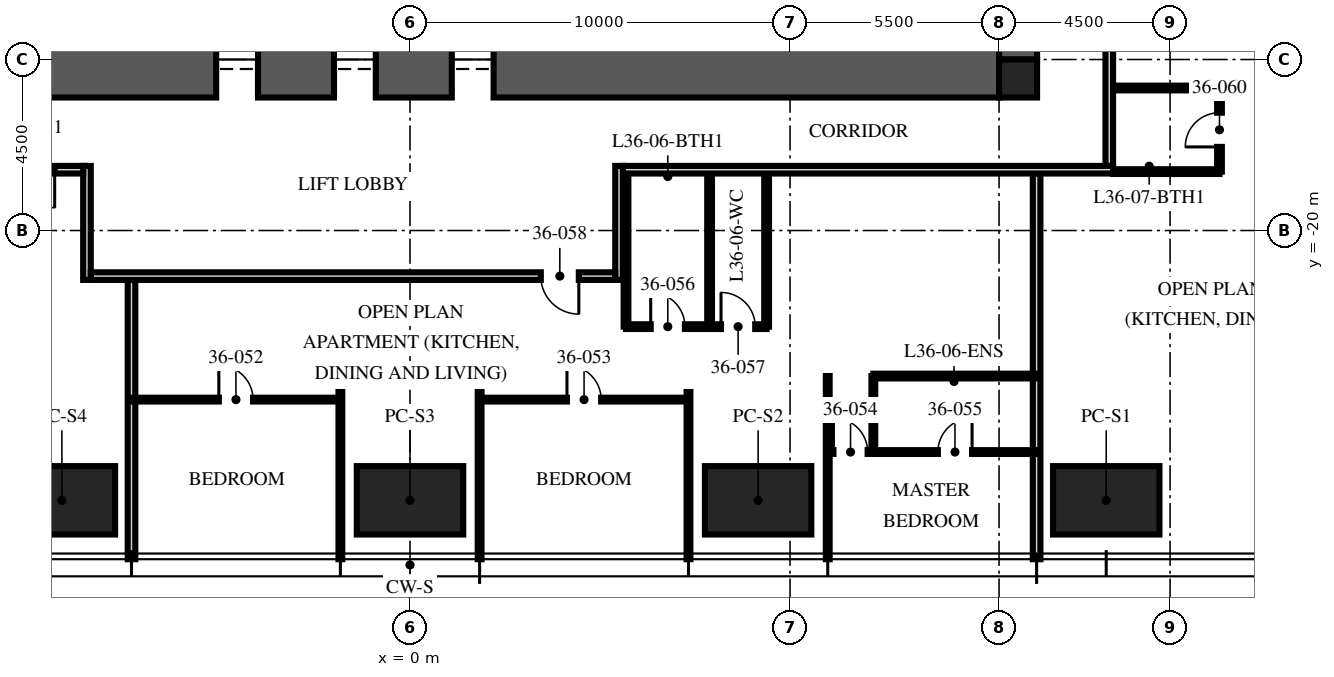
"""IFC4 building model, lengths in metres.
Left out: names, types, materials, properties, quantities, classifications, styles, units other than length and angle.
Written with IfcOpenShell. Run it as: python <this file> out.ifc"""

import sys

from ifc_helpers import new_model, si_unit, direction, frame, frame_2d, origin, origin_2d, place, context, subcontext, project, spatial, rectangle, extrude, element, fill, save


model = new_model("IFC4")
c1 = context("Model", 3, precision=1e-05, world=origin(), true_north=direction((0.0, 1.0)))
c2 = subcontext(c1, "Body", "Model", "MODEL_VIEW")
j1 = project(units=[si_unit("LENGTHUNIT", "METRE"), si_unit("PLANEANGLEUNIT", "RADIAN")], contexts=[c1])
p1 = place(None, origin())
s1 = spatial("IfcSite", under=j1, at=p1, CompositionType="ELEMENT")
p2 = place(p1, origin())
s2 = spatial("IfcBuilding", under=s1, at=p2, CompositionType="ELEMENT")
p3 = place(p2, frame((0.0, 0.0, 144.75)))
s3 = spatial("IfcBuildingStorey", under=s2, at=p3, CompositionType="ELEMENT", Elevation=144.75)
p4 = place(p3, frame((15.5, -15.5, -0.25), z_axis=(0.0, 0.0, 1.0), x_axis=(0.0, 1.0, 0.0)))
e1 = element("IfcWall", 1, at=p4, inside=s3, PredefinedType="SHEAR", context=c2, shape_type="SweptSolid", body=[
    extrude(rectangle(XDim=31.0, YDim=2.0, at=frame_2d((15.5, 0.0))), origin(), (0.0, 0.0, 1.0), 3.75),
])
p5 = place(p4, frame((6.5, 0.0, 0.25)))
e2 = element("IfcOpeningElement", 2, at=p5, cuts=e1, PredefinedType="OPENING", context=c2, shape_type="SweptSolid", body=[
    extrude(rectangle(XDim=1.2, YDim=2.1, at=frame_2d((0.6, 1.05))), frame((0.0, 1.01, 0.0), z_axis=(0.0, -1.0, 0.0), x_axis=(1.0, 0.0, 0.0)), (0.0, 0.0, 1.0), 2.02),
])
p6 = place(p4, frame((23.0, 0.0, 0.25)))
e3 = element("IfcOpeningElement", 3, at=p6, cuts=e1, PredefinedType="OPENING", context=c2, shape_type="SweptSolid", body=[
    extrude(rectangle(XDim=1.8, YDim=2.1, at=frame_2d((0.9, 1.05))), frame((0.0, 1.01, 0.0), z_axis=(0.0, -1.0, 0.0), x_axis=(1.0, 0.0, 0.0)), (0.0, 0.0, 1.0), 2.02),
])
p7 = place(p3, frame((-15.5, -15.5, -0.25), z_axis=(0.0, 0.0, 1.0), x_axis=(1.0, 0.0, 0.0)))
e4 = element("IfcWall", 4, at=p7, inside=s3, PredefinedType="SHEAR", context=c2, shape_type="SweptSolid", body=[
    extrude(rectangle(XDim=31.0, YDim=2.0, at=frame_2d((15.5, 0.0))), origin(), (0.0, 0.0, 1.0), 3.75),
])
p8 = place(p7, frame((10.4, 0.0, 0.25)))
e5 = element("IfcOpeningElement", 5, at=p8, cuts=e4, PredefinedType="OPENING", context=c2, shape_type="SweptSolid", body=[
    extrude(rectangle(XDim=1.1, YDim=2.1, at=frame_2d((0.55, 1.05))), frame((0.0, 1.01, 0.0), z_axis=(0.0, -1.0, 0.0), x_axis=(1.0, 0.0, 0.0)), (0.0, 0.0, 1.0), 2.02),
])
p9 = place(p7, frame((13.5, 0.0, 0.25)))
e6 = element("IfcOpeningElement", 6, at=p9, cuts=e4, PredefinedType="OPENING", context=c2, shape_type="SweptSolid", body=[
    extrude(rectangle(XDim=1.1, YDim=2.1, at=frame_2d((0.55, 1.05))), frame((0.0, 1.01, 0.0), z_axis=(0.0, -1.0, 0.0), x_axis=(1.0, 0.0, 0.0)), (0.0, 0.0, 1.0), 2.02),
])
p10 = place(p7, frame((16.6, 0.0, 0.25)))
e7 = element("IfcOpeningElement", 7, at=p10, cuts=e4, PredefinedType="OPENING", context=c2, shape_type="SweptSolid", body=[
    extrude(rectangle(XDim=1.1, YDim=2.1, at=frame_2d((0.55, 1.05))), frame((0.0, 1.01, 0.0), z_axis=(0.0, -1.0, 0.0), x_axis=(1.0, 0.0, 0.0)), (0.0, 0.0, 1.0), 2.02),
])
p11 = place(p3, frame((16.0, -16.0, -0.25), z_axis=(0.0, 0.0, 1.0), x_axis=(1.0, 0.0, 0.0)))
e8 = element("IfcColumn", 8, at=p11, inside=s3, PredefinedType="COLUMN", context=c2, shape_type="SweptSolid", body=[
    extrude(rectangle(XDim=1.0, YDim=1.0, at=origin_2d()), origin(), (0.0, 0.0, 1.0), 3.75),
])
for number, where, z_axis, x_axis in (
    (9, (18.32, -27.1, 0.0), (0.0, 0.0, 1.0), (1.0, 0.0, 0.0)),
    (10, (9.16, -27.1, 0.0), (0.0, 0.0, 1.0), (1.0, 0.0, 0.0)),
    (11, (0.0, -27.1, 0.0), (0.0, 0.0, 1.0), (1.0, 0.0, 0.0)),
    (12, (-9.16, -27.1, 0.0), (0.0, 0.0, 1.0), (1.0, 0.0, 0.0)),
):
    element("IfcColumn", number, at=place(p3, frame(where, z_axis=z_axis, x_axis=x_axis)), inside=s3, PredefinedType="COLUMN", context=c2, shape_type="SweptSolid", body=[
        extrude(rectangle(XDim=2.8, YDim=1.8, at=origin_2d()), origin(), (0.0, 0.0, 1.0), 3.75),
    ])
p12 = place(p3, frame((-7.328, -21.3, 0.0), z_axis=(0.0, 0.0, 1.0), x_axis=(0.0, -1.0, 0.0)))
e13 = element("IfcWall", 13, at=p12, inside=s3, PredefinedType="PARTITIONING", context=c2, shape_type="SweptSolid", body=[
    extrude(rectangle(XDim=7.35, YDim=0.2, at=frame_2d((3.675, 0.0))), origin(), (0.0, 0.0, 1.0), 2.81),
])
for number, where, z_axis, x_axis in (
    (14, (-1.832, -24.25, 0.0), (0.0, 0.0, 1.0), (0.0, -1.0, 0.0)),
    (15, (1.832, -24.25, 0.0), (0.0, 0.0, 1.0), (0.0, -1.0, 0.0)),
    (16, (7.328, -24.25, 0.0), (0.0, 0.0, 1.0), (0.0, -1.0, 0.0)),
):
    element("IfcWall", number, at=place(p3, frame(where, z_axis=z_axis, x_axis=x_axis)), inside=s3, PredefinedType="PARTITIONING", context=c2, shape_type="SweptSolid", body=[
        extrude(rectangle(XDim=4.4, YDim=0.1, at=frame_2d((2.2, 0.0))), origin(), (0.0, 0.0, 1.0), 2.81),
    ])
p13 = place(p3, frame((10.992, -23.83, 0.0), z_axis=(0.0, 0.0, 1.0), x_axis=(0.0, -1.0, 0.0)))
e17 = element("IfcWall", 17, at=p13, inside=s3, PredefinedType="PARTITIONING", context=c2, shape_type="SweptSolid", body=[
    extrude(rectangle(XDim=4.82, YDim=0.1, at=frame_2d((2.41, 0.0))), origin(), (0.0, 0.0, 1.0), 2.81),
])
p14 = place(p3, frame((16.488, -18.5, 0.0), z_axis=(0.0, 0.0, 1.0), x_axis=(0.0, -1.0, 0.0)))
e18 = element("IfcWall", 18, at=p14, inside=s3, PredefinedType="PARTITIONING", context=c2, shape_type="SweptSolid", body=[
    extrude(rectangle(XDim=10.15, YDim=0.2, at=frame_2d((5.075, 0.0))), origin(), (0.0, 0.0, 1.0), 2.81),
])
p15 = place(p3, frame((-7.328, -24.45, 0.0), z_axis=(0.0, 0.0, 1.0), x_axis=(1.0, 0.0, 0.0)))
e19 = element("IfcWall", 19, at=p15, inside=s3, PredefinedType="PARTITIONING", context=c2, shape_type="SweptSolid", body=[
    extrude(rectangle(XDim=5.496, YDim=0.1, at=frame_2d((2.748, 0.0))), origin(), (0.0, 0.0, 1.0), 2.81),
])
p16 = place(p15, frame((2.298, 0.0, 0.0)))
e20 = element("IfcOpeningElement", 20, at=p16, cuts=e19, PredefinedType="OPENING", context=c2, shape_type="SweptSolid", body=[
    extrude(rectangle(XDim=0.9, YDim=2.1, at=frame_2d((0.45, 1.05))), frame((0.0, 0.06, 0.0), z_axis=(0.0, -1.0, 0.0), x_axis=(1.0, 0.0, 0.0)), (0.0, 0.0, 1.0), 0.12),
])
p17 = place(p3, frame((1.832, -24.45, 0.0), z_axis=(0.0, 0.0, 1.0), x_axis=(1.0, 0.0, 0.0)))
e21 = element("IfcWall", 21, at=p17, inside=s3, PredefinedType="PARTITIONING", context=c2, shape_type="SweptSolid", body=[
    extrude(rectangle(XDim=5.496, YDim=0.1, at=frame_2d((2.748, 0.0))), origin(), (0.0, 0.0, 1.0), 2.81),
])
p18 = place(p17, frame((2.298, 0.0, 0.0)))
e22 = element("IfcOpeningElement", 22, at=p18, cuts=e21, PredefinedType="OPENING", context=c2, shape_type="SweptSolid", body=[
    extrude(rectangle(XDim=0.9, YDim=2.1, at=frame_2d((0.45, 1.05))), frame((0.0, 0.06, 0.0), z_axis=(0.0, -1.0, 0.0), x_axis=(1.0, 0.0, 0.0)), (0.0, 0.0, 1.0), 0.12),
])
p19 = place(p3, frame((10.992, -25.83, 0.0), z_axis=(0.0, 0.0, 1.0), x_axis=(1.0, 0.0, 0.0)))
e23 = element("IfcWall", 23, at=p19, inside=s3, PredefinedType="PARTITIONING", context=c2, shape_type="SweptSolid", body=[
    extrude(rectangle(XDim=5.496, YDim=0.1, at=frame_2d((2.748, 0.0))), origin(), (0.0, 0.0, 1.0), 2.81),
])
p20 = place(p19, frame((0.15, 0.0, 0.0)))
e24 = element("IfcOpeningElement", 24, at=p20, cuts=e23, PredefinedType="OPENING", context=c2, shape_type="SweptSolid", body=[
    extrude(rectangle(XDim=0.9, YDim=2.1, at=frame_2d((0.45, 1.05))), frame((0.0, 0.06, 0.0), z_axis=(0.0, -1.0, 0.0), x_axis=(1.0, 0.0, 0.0)), (0.0, 0.0, 1.0), 0.12),
])
p21 = place(p19, frame((2.898, 0.0, 0.0)))
e25 = element("IfcOpeningElement", 25, at=p21, cuts=e23, PredefinedType="OPENING", context=c2, shape_type="SweptSolid", body=[
    extrude(rectangle(XDim=0.9, YDim=2.1, at=frame_2d((0.45, 1.05))), frame((0.0, 0.06, 0.0), z_axis=(0.0, -1.0, 0.0), x_axis=(1.0, 0.0, 0.0)), (0.0, 0.0, 1.0), 0.12),
])
p22 = place(p3, frame((12.192, -23.83, 0.0), z_axis=(0.0, 0.0, 1.0), x_axis=(0.0, -1.0, 0.0)))
e26 = element("IfcWall", 26, at=p22, inside=s3, PredefinedType="PARTITIONING", context=c2, shape_type="SweptSolid", body=[
    extrude(rectangle(XDim=2.0, YDim=0.1, at=frame_2d((1.0, 0.0))), origin(), (0.0, 0.0, 1.0), 3.5),
])
p23 = place(p3, frame((12.192, -23.83, 0.0), z_axis=(0.0, 0.0, 1.0), x_axis=(1.0, 0.0, 0.0)))
e27 = element("IfcWall", 27, at=p23, inside=s3, PredefinedType="PARTITIONING", context=c2, shape_type="SweptSolid", body=[
    extrude(rectangle(XDim=4.296, YDim=0.125, at=frame_2d((2.148, 0.0))), origin(), (0.0, 0.0, 1.0), 2.81),
])
p24 = place(p3, frame((5.684, -22.53, 0.0), z_axis=(0.0, 0.0, 1.0), x_axis=(1.0, 0.0, 0.0)))
e28 = element("IfcWall", 28, at=p24, inside=s3, PredefinedType="PARTITIONING", context=c2, shape_type="SweptSolid", body=[
    extrude(rectangle(XDim=3.7, YDim=0.125, at=frame_2d((1.85, 0.0))), origin(), (0.0, 0.0, 1.0), 2.7),
])
p25 = place(p24, frame((0.65, 0.0, 0.0)))
e29 = element("IfcOpeningElement", 29, at=p25, cuts=e28, PredefinedType="OPENING", context=c2, shape_type="SweptSolid", body=[
    extrude(rectangle(XDim=0.9, YDim=2.1, at=frame_2d((0.45, 1.05))), frame((0.0, 0.073, 0.0), z_axis=(0.0, -1.0, 0.0), x_axis=(1.0, 0.0, 0.0)), (0.0, 0.0, 1.0), 0.145),
])
p26 = place(p24, frame((2.5, 0.0, 0.0)))
e30 = element("IfcOpeningElement", 30, at=p26, cuts=e28, PredefinedType="OPENING", context=c2, shape_type="SweptSolid", body=[
    extrude(rectangle(XDim=0.9, YDim=2.1, at=frame_2d((0.45, 1.05))), frame((0.0, 0.073, 0.0), z_axis=(0.0, -1.0, 0.0), x_axis=(1.0, 0.0, 0.0)), (0.0, 0.0, 1.0), 0.145),
])
for number, where, z_axis, x_axis in (
    (31, (5.684, -18.5, 0.0), (0.0, 0.0, 1.0), (0.0, -1.0, 0.0)),
    (32, (7.884, -18.5, 0.0), (0.0, 0.0, 1.0), (0.0, -1.0, 0.0)),
    (33, (9.384, -18.5, 0.0), (0.0, 0.0, 1.0), (0.0, -1.0, 0.0)),
):
    element("IfcWall", number, at=place(p3, frame(where, z_axis=z_axis, x_axis=x_axis)), inside=s3, PredefinedType="PARTITIONING", context=c2, shape_type="SweptSolid", body=[
        extrude(rectangle(XDim=4.03, YDim=0.125, at=frame_2d((2.015, 0.0))), origin(), (0.0, 0.0, 1.0), 3.5),
    ])
p27 = place(p3, frame((21.3, -18.45, 0.0), z_axis=(0.0, 0.0, 1.0), x_axis=(0.0, 1.0, 0.0)))
e34 = element("IfcWall", 34, at=p27, inside=s3, PredefinedType="PARTITIONING", context=c2, shape_type="SweptSolid", body=[
    extrude(rectangle(XDim=2.2, YDim=0.125, at=frame_2d((1.1, 0.0))), origin(), (0.0, 0.0, 1.0), 2.7),
])
p28 = place(p27, frame((0.65, 0.0, 0.0)))
e35 = element("IfcOpeningElement", 35, at=p28, cuts=e34, PredefinedType="OPENING", context=c2, shape_type="SweptSolid", body=[
    extrude(rectangle(XDim=0.9, YDim=2.1, at=frame_2d((0.45, 1.05))), frame((0.0, 0.073, 0.0), z_axis=(0.0, -1.0, 0.0), x_axis=(1.0, 0.0, 0.0)), (0.0, 0.0, 1.0), 0.145),
])
p29 = place(p3, frame((18.5, -18.45, 0.0), z_axis=(0.0, 0.0, 1.0), x_axis=(1.0, 0.0, 0.0)))
e36 = element("IfcWall", 36, at=p29, inside=s3, PredefinedType="PARTITIONING", context=c2, shape_type="SweptSolid", body=[
    extrude(rectangle(XDim=2.8, YDim=0.125, at=frame_2d((1.4, 0.0))), origin(), (0.0, 0.0, 1.0), 2.3),
])
p30 = place(p3, frame((18.5, -16.25, 0.0), z_axis=(0.0, 0.0, 1.0), x_axis=(1.0, 0.0, 0.0)))
e37 = element("IfcWall", 37, at=p30, inside=s3, PredefinedType="PARTITIONING", context=c2, shape_type="SweptSolid", body=[
    extrude(rectangle(XDim=2.8, YDim=0.125, at=frame_2d((1.4, 0.0))), origin(), (0.0, 0.0, 1.0), 3.5),
])
p31 = place(p3, frame((18.4, -18.3, 0.0), z_axis=(0.0, 0.0, 1.0), x_axis=(0.0, 1.0, 0.0)))
e38 = element("IfcWall", 38, at=p31, inside=s3, PredefinedType="PARTITIONING", context=c2, shape_type="SweptSolid", body=[
    extrude(rectangle(XDim=8.972, YDim=0.2, at=frame_2d((4.486, 0.0))), origin(), (0.0, 0.0, 1.0), 2.3),
])
p32 = place(p3, frame((18.5, -18.4, 0.0), z_axis=(0.0, 0.0, 1.0), x_axis=(-1.0, 0.0, 0.0)))
e39 = element("IfcWall", 39, at=p32, inside=s3, PredefinedType="PARTITIONING", context=c2, shape_type="SweptSolid", body=[
    extrude(rectangle(XDim=12.9, YDim=0.2, at=frame_2d((6.45, 0.0))), origin(), (0.0, 0.0, 1.0), 2.3),
])
for number, where, z_axis, x_axis in (
    (40, (5.5, -18.3, 0.0), (0.0, 0.0, 1.0), (0.0, -1.0, 0.0)),
    (41, (-8.5, -18.3, 0.0), (0.0, 0.0, 1.0), (0.0, -1.0, 0.0)),
):
    element("IfcWall", number, at=place(p3, frame(where, z_axis=z_axis, x_axis=x_axis)), inside=s3, PredefinedType="PARTITIONING", context=c2, shape_type="SweptSolid", body=[
        extrude(rectangle(XDim=3.0, YDim=0.2, at=frame_2d((1.5, 0.0))), origin(), (0.0, 0.0, 1.0), 3.5),
    ])
p33 = place(p3, frame((5.4, -21.2, 0.0), z_axis=(0.0, 0.0, 1.0), x_axis=(-1.0, 0.0, 0.0)))
e42 = element("IfcWall", 42, at=p33, inside=s3, PredefinedType="PARTITIONING", context=c2, shape_type="SweptSolid", body=[
    extrude(rectangle(XDim=13.8, YDim=0.2, at=frame_2d((6.9, 0.0))), origin(), (0.0, 0.0, 1.0), 2.7),
])
p34 = place(p33, frame((0.958, 0.0, 0.0)))
e43 = element("IfcOpeningElement", 43, at=p34, cuts=e42, PredefinedType="OPENING", context=c2, shape_type="SweptSolid", body=[
    extrude(rectangle(XDim=1.0, YDim=2.2, at=frame_2d((0.5, 1.1))), frame((0.0, 0.11, 0.0), z_axis=(0.0, -1.0, 0.0), x_axis=(1.0, 0.0, 0.0)), (0.0, 0.0, 1.0), 0.22),
])
p35 = place(p3, frame((-8.6, -18.4, 0.0), z_axis=(0.0, 0.0, 1.0), x_axis=(-1.0, 0.0, 0.0)))
e44 = element("IfcWall", 44, at=p35, inside=s3, PredefinedType="PARTITIONING", context=c2, shape_type="SweptSolid", body=[
    extrude(rectangle(XDim=9.9, YDim=0.2, at=frame_2d((4.95, 0.0))), origin(), (0.0, 0.0, 1.0), 2.3),
])
p36 = place(p35, frame((0.75, 0.0, 0.0)))
e45 = element("IfcOpeningElement", 45, at=p36, cuts=e44, PredefinedType="OPENING", context=c2, shape_type="SweptSolid", body=[
    extrude(rectangle(XDim=1.0, YDim=2.2, at=frame_2d((0.5, 1.1))), frame((0.0, 0.11, 0.0), z_axis=(0.0, -1.0, 0.0), x_axis=(1.0, 0.0, 0.0)), (0.0, 0.0, 1.0), 0.22),
])
p37 = place(p8, origin())
e46 = element("IfcDoor", 46, at=p37, inside=s3, OperationType="DOUBLE_DOOR_SLIDING", PredefinedType="DOOR", context=c2, shape_type="SweptSolid", body=[
    extrude(rectangle(XDim=1.1, YDim=2.1, at=frame_2d((0.55, 1.05))), frame((0.0, 0.025, 0.0), z_axis=(0.0, -1.0, 0.0), x_axis=(1.0, 0.0, 0.0)), (0.0, 0.0, 1.0), 0.05),
])
fill(e5, e46)
p38 = place(p9, origin())
e47 = element("IfcDoor", 47, at=p38, inside=s3, OperationType="DOUBLE_DOOR_SLIDING", PredefinedType="DOOR", context=c2, shape_type="SweptSolid", body=[
    extrude(rectangle(XDim=1.1, YDim=2.1, at=frame_2d((0.55, 1.05))), frame((0.0, 0.025, 0.0), z_axis=(0.0, -1.0, 0.0), x_axis=(1.0, 0.0, 0.0)), (0.0, 0.0, 1.0), 0.05),
])
fill(e6, e47)
p39 = place(p10, origin())
e48 = element("IfcDoor", 48, at=p39, inside=s3, OperationType="DOUBLE_DOOR_SLIDING", PredefinedType="DOOR", context=c2, shape_type="SweptSolid", body=[
    extrude(rectangle(XDim=1.1, YDim=2.1, at=frame_2d((0.55, 1.05))), frame((0.0, 0.025, 0.0), z_axis=(0.0, -1.0, 0.0), x_axis=(1.0, 0.0, 0.0)), (0.0, 0.0, 1.0), 0.05),
])
fill(e7, e48)
p40 = place(p36, origin())
e49 = element("IfcDoor", 49, at=p40, inside=s3, OperationType="SINGLE_SWING_LEFT", PredefinedType="DOOR", context=c2, shape_type="SweptSolid", body=[
    extrude(rectangle(XDim=1.0, YDim=2.2, at=frame_2d((0.5, 1.1))), frame((0.0, 0.025, 0.0), z_axis=(0.0, -1.0, 0.0), x_axis=(1.0, 0.0, 0.0)), (0.0, 0.0, 1.0), 0.05),
])
fill(e45, e49)
p41 = place(p16, origin())
e50 = element("IfcDoor", 50, at=p41, inside=s3, OperationType="SINGLE_SWING_LEFT", PredefinedType="DOOR", context=c2, shape_type="SweptSolid", body=[
    extrude(rectangle(XDim=0.9, YDim=2.1, at=frame_2d((0.45, 1.05))), frame((0.0, 0.025, 0.0), z_axis=(0.0, -1.0, 0.0), x_axis=(1.0, 0.0, 0.0)), (0.0, 0.0, 1.0), 0.05),
])
fill(e20, e50)
p42 = place(p18, origin())
e51 = element("IfcDoor", 51, at=p42, inside=s3, OperationType="SINGLE_SWING_LEFT", PredefinedType="DOOR", context=c2, shape_type="SweptSolid", body=[
    extrude(rectangle(XDim=0.9, YDim=2.1, at=frame_2d((0.45, 1.05))), frame((0.0, 0.025, 0.0), z_axis=(0.0, -1.0, 0.0), x_axis=(1.0, 0.0, 0.0)), (0.0, 0.0, 1.0), 0.05),
])
fill(e22, e51)
p43 = place(p20, origin())
e52 = element("IfcDoor", 52, at=p43, inside=s3, OperationType="SINGLE_SWING_LEFT", PredefinedType="DOOR", context=c2, shape_type="SweptSolid", body=[
    extrude(rectangle(XDim=0.9, YDim=2.1, at=frame_2d((0.45, 1.05))), frame((0.0, 0.025, 0.0), z_axis=(0.0, -1.0, 0.0), x_axis=(1.0, 0.0, 0.0)), (0.0, 0.0, 1.0), 0.05),
])
fill(e24, e52)
p44 = place(p21, origin())
e53 = element("IfcDoor", 53, at=p44, inside=s3, OperationType="SINGLE_SWING_RIGHT", PredefinedType="DOOR", context=c2, shape_type="SweptSolid", body=[
    extrude(rectangle(XDim=0.9, YDim=2.1, at=frame_2d((0.45, 1.05))), frame((0.0, 0.025, 0.0), z_axis=(0.0, -1.0, 0.0), x_axis=(1.0, 0.0, 0.0)), (0.0, 0.0, 1.0), 0.05),
])
fill(e25, e53)
p45 = place(p25, origin())
e54 = element("IfcDoor", 54, at=p45, inside=s3, OperationType="SINGLE_SWING_LEFT", PredefinedType="DOOR", context=c2, shape_type="SweptSolid", body=[
    extrude(rectangle(XDim=0.9, YDim=2.1, at=frame_2d((0.45, 1.05))), frame((0.0, 0.025, 0.0), z_axis=(0.0, -1.0, 0.0), x_axis=(1.0, 0.0, 0.0)), (0.0, 0.0, 1.0), 0.05),
])
fill(e29, e54)
p46 = place(p26, origin())
e55 = element("IfcDoor", 55, at=p46, inside=s3, OperationType="SINGLE_SWING_LEFT", PredefinedType="DOOR", context=c2, shape_type="SweptSolid", body=[
    extrude(rectangle(XDim=0.9, YDim=2.1, at=frame_2d((0.45, 1.05))), frame((0.0, 0.025, 0.0), z_axis=(0.0, -1.0, 0.0), x_axis=(1.0, 0.0, 0.0)), (0.0, 0.0, 1.0), 0.05),
])
fill(e30, e55)
p47 = place(p34, origin())
e56 = element("IfcDoor", 56, at=p47, inside=s3, OperationType="SINGLE_SWING_LEFT", PredefinedType="DOOR", context=c2, shape_type="SweptSolid", body=[
    extrude(rectangle(XDim=1.0, YDim=2.2, at=frame_2d((0.5, 1.1))), frame((0.0, 0.025, 0.0), z_axis=(0.0, -1.0, 0.0), x_axis=(1.0, 0.0, 0.0)), (0.0, 0.0, 1.0), 0.05),
])
fill(e43, e56)
p48 = place(p28, origin())
e57 = element("IfcDoor", 57, at=p48, inside=s3, OperationType="SINGLE_SWING_LEFT", PredefinedType="DOOR", context=c2, shape_type="SweptSolid", body=[
    extrude(rectangle(XDim=0.9, YDim=2.1, at=frame_2d((0.45, 1.05))), frame((0.0, 0.025, 0.0), z_axis=(0.0, -1.0, 0.0), x_axis=(1.0, 0.0, 0.0)), (0.0, 0.0, 1.0), 0.05),
])
fill(e35, e57)
save(model, sys.argv[1])
